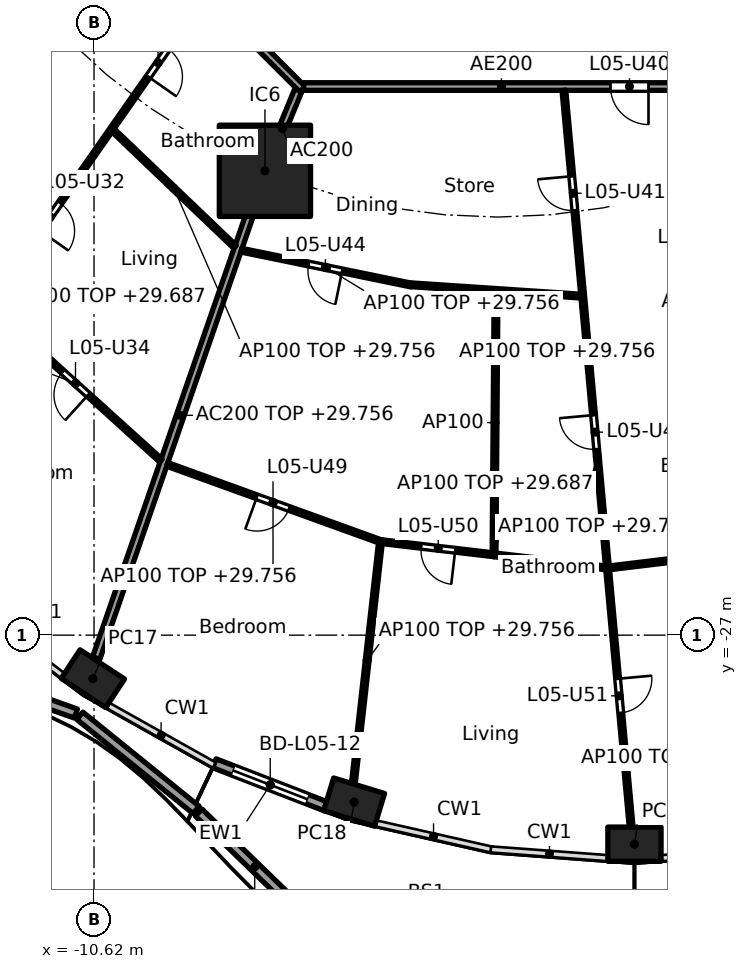
"""IFC4 building model, lengths in metres.
Left out: names, types, materials, properties, quantities, classifications, styles, units other than length and angle.
Written with IfcOpenShell. Run it as: python <this file> out.ifc"""

import sys

from ifc_helpers import new_model, si_unit, direction, frame, frame_2d, origin, origin_2d, place, context, subcontext, project, spatial, rectangle, hollow_rectangle, extrude, element, fill, save


model = new_model("IFC4")
c1 = context("Model", 3, precision=1e-05, world=origin(), true_north=direction((0.0, 1.0)))
c2 = subcontext(c1, "Body", "Model", "MODEL_VIEW")
j1 = project(units=[si_unit("LENGTHUNIT", "METRE"), si_unit("PLANEANGLEUNIT", "RADIAN")], contexts=[c1])
p1 = place(None, origin())
s1 = spatial("IfcSite", under=j1, at=p1, CompositionType="ELEMENT")
p2 = place(p1, origin())
s2 = spatial("IfcBuilding", under=s1, at=p2, CompositionType="ELEMENT")
p3 = place(p2, frame((0.0, 0.0, 27.0)))
s3 = spatial("IfcBuildingStorey", under=s2, at=p3, CompositionType="ELEMENT", Elevation=27.0)
for number, where, z_axis, x_axis in (
    (1, (-10.65, -28.146, 0.0), (0.0, 0.0, 1.0), (0.836, -0.549, 0.0)),
    (2, (-3.776, -31.393, 0.0), (0.0, 0.0, 1.0), (0.957, -0.292, 0.0)),
    (3, (3.6, -32.5, 0.0), (0.0, 0.0, 1.0), (1.0, 0.0, 0.0)),
):
    element("IfcColumn", number, at=place(p3, frame(where, z_axis=z_axis, x_axis=x_axis)), inside=s3, PredefinedType="COLUMN", context=c2, shape_type="SweptSolid", body=[
        extrude(hollow_rectangle(XDim=1.4, YDim=0.9, WallThickness=0.05, at=origin_2d()), origin(), (0.0, 0.0, 1.0), 3.7),
    ])
p4 = place(p3, frame((-6.123, -14.782, 0.0), z_axis=(0.0, 0.0, 1.0), x_axis=(1.0, 0.0, 0.0)))
e4 = element("IfcColumn", 4, at=p4, inside=s3, PredefinedType="COLUMN", context=c2, shape_type="SweptSolid", body=[
    extrude(rectangle(XDim=2.4, YDim=2.4, at=origin_2d()), origin(), (0.0, 0.0, 1.0), 3.7),
])
p5 = place(p3, frame((-4.514, -31.507, 0.0), z_axis=(0.0, 0.0, 1.0), x_axis=(-0.932809381943, 0.360370166577, 0.0)))
e5 = element("IfcWall", 5, at=p5, inside=s3, PredefinedType="SOLIDWALL", context=c2, shape_type="SweptSolid", body=[
    extrude(rectangle(XDim=3.151, YDim=0.25, at=frame_2d((1.575, 0.0))), origin(), (0.0, 0.0, 1.0), 3.44),
])
p6 = place(p5, frame((0.525, 0.0, 0.0)))
e6 = element("IfcOpeningElement", 6, at=p6, cuts=e5, PredefinedType="OPENING", context=c2, shape_type="SweptSolid", body=[
    extrude(rectangle(XDim=2.1, YDim=2.4, at=frame_2d((1.05, 1.2))), frame((0.0, 0.135, 0.0), z_axis=(0.0, -1.0, 0.0), x_axis=(1.0, 0.0, 0.0)), (0.0, 0.0, 1.0), 0.27),
])
p7 = place(p3, frame((-17.373, -26.838, 0.0), z_axis=(0.0, 0.0, 1.0), x_axis=(0.94252427227, -0.334137690453, 0.0)))
e7 = element("IfcWall", 7, at=p7, inside=s3, PredefinedType="PARAPET", context=c2, shape_type="SweptSolid", body=[
    extrude(rectangle(XDim=6.657, YDim=0.25, at=frame_2d((3.329, 0.0))), origin(), (0.0, 0.0, 1.0), 1.1),
])
p8 = place(p3, frame((-10.993, -29.122, 0.0), z_axis=(0.0, 0.0, 1.0), x_axis=(0.777298307168, -0.62913221319, 0.0)))
e8 = element("IfcWall", 8, at=p8, inside=s3, PredefinedType="PARAPET", context=c2, shape_type="SweptSolid", body=[
    extrude(rectangle(XDim=3.937, YDim=0.25, at=frame_2d((1.968, 0.0))), origin(), (0.0, 0.0, 1.0), 1.1),
])
p9 = place(p3, frame((-7.866, -31.667, 0.0), z_axis=(0.0, 0.0, 1.0), x_axis=(0.717813068458, -0.696235878672, 0.0)))
e9 = element("IfcWall", 9, at=p9, inside=s3, PredefinedType="PARAPET", context=c2, shape_type="SweptSolid", body=[
    extrude(rectangle(XDim=4.107, YDim=0.25, at=frame_2d((2.054, 0.0))), origin(), (0.0, 0.0, 1.0), 1.1),
])
p10 = place(p3, frame((3.487, -34.99, 0.0), z_axis=(0.0, 0.0, 1.0), x_axis=(0.932281162563, 0.361734479874, 0.0)))
e10 = element("IfcWall", 10, at=p10, inside=s3, PredefinedType="PARAPET", context=c2, shape_type="SweptSolid", body=[
    extrude(rectangle(XDim=5.513, YDim=0.25, at=frame_2d((2.756, 0.0))), origin(), (0.0, 0.0, 1.0), 1.1),
])
p11 = place(p3, frame((-5.243, -12.657, 0.0), z_axis=(0.0, 0.0, 1.0), x_axis=(-0.382668627144, -0.923885664896, 0.0)))
e11 = element("IfcWall", 11, at=p11, inside=s3, PredefinedType="PARTITIONING", context=c2, shape_type="SweptSolid", body=[
    extrude(rectangle(XDim=2.2, YDim=0.2, at=frame_2d((1.1, 0.0))), origin(), (0.0, 0.0, 1.0), 3.44),
])
p12 = place(p3, frame((-6.139, -14.829, 0.0), z_axis=(0.0, 0.0, 1.0), x_axis=(-0.327178799566, -0.944962450637, 0.0)))
e12 = element("IfcWall", 12, at=p12, inside=s3, PredefinedType="PARTITIONING", context=c2, shape_type="SweptSolid", body=[
    extrude(rectangle(XDim=13.517, YDim=0.2, at=frame_2d((6.759, 0.0))), origin(), (0.0, 0.0, 1.0), 2.756),
])
p13 = place(p3, frame((-12.635, -5.134, 0.0), z_axis=(0.0, 0.0, 1.0), x_axis=(0.707106781187, -0.707106781187, 0.0)))
e13 = element("IfcWall", 13, at=p13, inside=s3, PredefinedType="PARTITIONING", context=c2, shape_type="SweptSolid", body=[
    extrude(rectangle(XDim=10.609, YDim=0.2, at=frame_2d((5.305, 0.0))), origin(), (0.0, 0.0, 1.0), 3.44),
])
p14 = place(p13, frame((4.804, 0.0, 0.0)))
e14 = element("IfcOpeningElement", 14, at=p14, cuts=e13, PredefinedType="OPENING", context=c2, shape_type="SweptSolid", body=[
    extrude(rectangle(XDim=1.0, YDim=2.1, at=frame_2d((0.5, 1.05))), frame((0.0, 0.11, 0.0), z_axis=(0.0, -1.0, 0.0), x_axis=(1.0, 0.0, 0.0)), (0.0, 0.0, 1.0), 0.22),
])
p15 = place(p3, frame((-5.104, -12.565, 0.0), z_axis=(0.0, 0.0, 1.0), x_axis=(1.0, 0.0, 0.0)))
e15 = element("IfcWall", 15, at=p15, inside=s3, PredefinedType="PARTITIONING", context=c2, shape_type="SweptSolid", body=[
    extrude(rectangle(XDim=10.409, YDim=0.2, at=frame_2d((5.205, 0.0))), origin(), (0.0, 0.0, 1.0), 3.44),
])
p16 = place(p15, frame((8.074, 0.0, 0.0)))
e16 = element("IfcOpeningElement", 16, at=p16, cuts=e15, PredefinedType="OPENING", context=c2, shape_type="SweptSolid", body=[
    extrude(rectangle(XDim=1.0, YDim=2.1, at=frame_2d((0.5, 1.05))), frame((0.0, 0.11, 0.0), z_axis=(0.0, -1.0, 0.0), x_axis=(1.0, 0.0, 0.0)), (0.0, 0.0, 1.0), 0.22),
])
p17 = place(p3, frame((-10.19, -7.719, 0.0), z_axis=(0.0, 0.0, 1.0), x_axis=(-0.790264549439, -0.612765813259, 0.0)))
e17 = element("IfcWall", 17, at=p17, inside=s3, PredefinedType="PARTITIONING", context=c2, shape_type="SweptSolid", body=[
    extrude(rectangle(XDim=8.896, YDim=0.1, at=frame_2d((4.448, 0.0))), origin(), (0.0, 0.0, 1.0), 2.687),
])
p18 = place(p17, frame((1.448, 0.0, 0.0)))
e18 = element("IfcOpeningElement", 18, at=p18, cuts=e17, PredefinedType="OPENING", context=c2, shape_type="SweptSolid", body=[
    extrude(rectangle(XDim=0.9, YDim=2.1, at=frame_2d((0.45, 1.05))), frame((0.0, 0.06, 0.0), z_axis=(0.0, -1.0, 0.0), x_axis=(1.0, 0.0, 0.0)), (0.0, 0.0, 1.0), 0.12),
])
p19 = place(p17, frame((5.871, 0.0, 0.0)))
e19 = element("IfcOpeningElement", 19, at=p19, cuts=e17, PredefinedType="OPENING", context=c2, shape_type="SweptSolid", body=[
    extrude(rectangle(XDim=0.9, YDim=2.1, at=frame_2d((0.45, 1.05))), frame((0.0, 0.06, 0.0), z_axis=(0.0, -1.0, 0.0), x_axis=(1.0, 0.0, 0.0)), (0.0, 0.0, 1.0), 0.12),
])
p20 = place(p3, frame((-7.715, -10.193, 0.0), z_axis=(0.0, 0.0, 1.0), x_axis=(-0.573126964124, -0.819466584428, 0.0)))
e20 = element("IfcWall", 20, at=p20, inside=s3, PredefinedType="PARTITIONING", context=c2, shape_type="SweptSolid", body=[
    extrude(rectangle(XDim=15.001, YDim=0.1, at=frame_2d((7.5, 0.0))), origin(), (0.0, 0.0, 1.0), 2.687),
])
p21 = place(p20, frame((1.678, 0.0, 0.0)))
e21 = element("IfcOpeningElement", 21, at=p21, cuts=e20, PredefinedType="OPENING", context=c2, shape_type="SweptSolid", body=[
    extrude(rectangle(XDim=0.9, YDim=2.1, at=frame_2d((0.45, 1.05))), frame((0.0, 0.06, 0.0), z_axis=(0.0, -1.0, 0.0), x_axis=(1.0, 0.0, 0.0)), (0.0, 0.0, 1.0), 0.12),
])
p22 = place(p20, frame((6.631, 0.0, 0.0)))
e22 = element("IfcOpeningElement", 22, at=p22, cuts=e20, PredefinedType="OPENING", context=c2, shape_type="SweptSolid", body=[
    extrude(rectangle(XDim=0.9, YDim=2.1, at=frame_2d((0.45, 1.05))), frame((0.0, 0.06, 0.0), z_axis=(0.0, -1.0, 0.0), x_axis=(1.0, 0.0, 0.0)), (0.0, 0.0, 1.0), 0.12),
])
p23 = place(p3, frame((-10.119, -13.716, 0.0), z_axis=(0.0, 0.0, 1.0), x_axis=(0.722775679202, -0.691082713975, 0.0)))
e23 = element("IfcWall", 23, at=p23, inside=s3, PredefinedType="PARTITIONING", context=c2, shape_type="SweptSolid", body=[
    extrude(rectangle(XDim=4.437, YDim=0.1, at=frame_2d((2.219, 0.0))), origin(), (0.0, 0.0, 1.0), 2.756),
])
p24 = place(p3, frame((-13.355, -18.343, 0.0), z_axis=(0.0, 0.0, 1.0), x_axis=(0.741713303551, -0.670717060567, 0.0)))
e24 = element("IfcWall", 24, at=p24, inside=s3, PredefinedType="PARTITIONING", context=c2, shape_type="SweptSolid", body=[
    extrude(rectangle(XDim=6.059, YDim=0.1, at=frame_2d((3.03, 0.0))), origin(), (0.0, 0.0, 1.0), 2.756),
])
p25 = place(p24, frame((2.58, 0.0, 0.0)))
e25 = element("IfcOpeningElement", 25, at=p25, cuts=e24, PredefinedType="OPENING", context=c2, shape_type="SweptSolid", body=[
    extrude(rectangle(XDim=0.9, YDim=2.1, at=frame_2d((0.45, 1.05))), frame((0.0, 0.06, 0.0), z_axis=(0.0, -1.0, 0.0), x_axis=(1.0, 0.0, 0.0)), (0.0, 0.0, 1.0), 0.12),
])
p26 = place(p3, frame((-6.741, -16.872, 0.0), z_axis=(0.0, 0.0, 1.0), x_axis=(0.979595137747, -0.200981009307, 0.0)))
e26 = element("IfcWall", 26, at=p26, inside=s3, PredefinedType="PARTITIONING", context=c2, shape_type="SweptSolid", body=[
    extrude(rectangle(XDim=4.562, YDim=0.1, at=frame_2d((2.281, 0.0))), origin(), (0.0, 0.0, 1.0), 2.756),
])
p27 = place(p26, frame((1.806, 0.0, 0.0)))
e27 = element("IfcOpeningElement", 27, at=p27, cuts=e26, PredefinedType="OPENING", context=c2, shape_type="SweptSolid", body=[
    extrude(rectangle(XDim=0.9, YDim=2.1, at=frame_2d((0.45, 1.05))), frame((0.0, 0.06, 0.0), z_axis=(0.0, -1.0, 0.0), x_axis=(1.0, 0.0, 0.0)), (0.0, 0.0, 1.0), 0.12),
])
p28 = place(p3, frame((-8.692, -22.508, 0.0), z_axis=(0.0, 0.0, 1.0), x_axis=(0.940401494588, -0.340066212636, 0.0)))
e28 = element("IfcWall", 28, at=p28, inside=s3, PredefinedType="PARTITIONING", context=c2, shape_type="SweptSolid", body=[
    extrude(rectangle(XDim=5.917, YDim=0.1, at=frame_2d((2.958, 0.0))), origin(), (0.0, 0.0, 1.0), 2.756),
])
p29 = place(p28, frame((2.509, 0.0, 0.0)))
e29 = element("IfcOpeningElement", 29, at=p29, cuts=e28, PredefinedType="OPENING", context=c2, shape_type="SweptSolid", body=[
    extrude(rectangle(XDim=0.9, YDim=2.1, at=frame_2d((0.45, 1.05))), frame((0.0, 0.06, 0.0), z_axis=(0.0, -1.0, 0.0), x_axis=(1.0, 0.0, 0.0)), (0.0, 0.0, 1.0), 0.12),
])
p30 = place(p3, frame((-2.271, -17.782, 0.0), z_axis=(0.0, 0.0, 1.0), x_axis=(0.997791437766, -0.066424744789, 0.0)))
e30 = element("IfcWall", 30, at=p30, inside=s3, PredefinedType="PARTITIONING", context=c2, shape_type="SweptSolid", body=[
    extrude(rectangle(XDim=4.469, YDim=0.1, at=frame_2d((2.235, 0.0))), origin(), (0.0, 0.0, 1.0), 2.756),
])
p31 = place(p3, frame((-3.075, -24.488, 0.0), z_axis=(0.0, 0.0, 1.0), x_axis=(-0.111705235978, -0.993741384997, 0.0)))
e31 = element("IfcWall", 31, at=p31, inside=s3, PredefinedType="PARTITIONING", context=c2, shape_type="SweptSolid", body=[
    extrude(rectangle(XDim=6.395, YDim=0.1, at=frame_2d((3.198, 0.0))), origin(), (0.0, 0.0, 1.0), 2.756),
])
p32 = place(p3, frame((-3.031, -24.543, 0.0), z_axis=(0.0, 0.0, 1.0), x_axis=(0.993255612046, -0.115945198862, 0.0)))
e32 = element("IfcWall", 32, at=p32, inside=s3, PredefinedType="PARTITIONING", context=c2, shape_type="SweptSolid", body=[
    extrude(rectangle(XDim=5.913, YDim=0.1, at=frame_2d((2.956, 0.0))), origin(), (0.0, 0.0, 1.0), 2.756),
])
p33 = place(p32, frame((1.028, 0.0, 0.0)))
e33 = element("IfcOpeningElement", 33, at=p33, cuts=e32, PredefinedType="OPENING", context=c2, shape_type="SweptSolid", body=[
    extrude(rectangle(XDim=0.9, YDim=2.1, at=frame_2d((0.45, 1.05))), frame((0.0, 0.06, 0.0), z_axis=(0.0, -1.0, 0.0), x_axis=(1.0, 0.0, 0.0)), (0.0, 0.0, 1.0), 0.12),
])
p34 = place(p3, frame((-0.042, -17.98, 0.0), z_axis=(0.0, 0.0, 1.0), x_axis=(-0.007692080119, -0.999970415514, 0.0)))
e34 = element("IfcWall", 34, at=p34, inside=s3, PredefinedType="PARTITIONING", context=c2, shape_type="SweptSolid", body=[
    extrude(rectangle(XDim=6.856, YDim=0.1, at=frame_2d((3.428, 0.0))), origin(), (0.0, 0.0, 1.0), 3.44),
])
p35 = place(p3, frame((1.744, -12.664, 0.0), z_axis=(0.0, 0.0, 1.0), x_axis=(0.090893639596, -0.995860605849, 0.0)))
e35 = element("IfcWall", 35, at=p35, inside=s3, PredefinedType="PARTITIONING", context=c2, shape_type="SweptSolid", body=[
    extrude(rectangle(XDim=19.374, YDim=0.1, at=frame_2d((9.687, 0.0))), origin(), (0.0, 0.0, 1.0), 2.687),
])
p36 = place(p35, frame((2.27, 0.0, 0.0)))
e36 = element("IfcOpeningElement", 36, at=p36, cuts=e35, PredefinedType="OPENING", context=c2, shape_type="SweptSolid", body=[
    extrude(rectangle(XDim=0.9, YDim=2.1, at=frame_2d((0.45, 1.05))), frame((0.0, 0.06, 0.0), z_axis=(0.0, -1.0, 0.0), x_axis=(1.0, 0.0, 0.0)), (0.0, 0.0, 1.0), 0.12),
])
p37 = place(p35, frame((8.582, 0.0, 0.0)))
e37 = element("IfcOpeningElement", 37, at=p37, cuts=e35, PredefinedType="OPENING", context=c2, shape_type="SweptSolid", body=[
    extrude(rectangle(XDim=0.9, YDim=2.1, at=frame_2d((0.45, 1.05))), frame((0.0, 0.06, 0.0), z_axis=(0.0, -1.0, 0.0), x_axis=(1.0, 0.0, 0.0)), (0.0, 0.0, 1.0), 0.12),
])
p38 = place(p35, frame((15.548, 0.0, 0.0)))
e38 = element("IfcOpeningElement", 38, at=p38, cuts=e35, PredefinedType="OPENING", context=c2, shape_type="SweptSolid", body=[
    extrude(rectangle(XDim=0.9, YDim=2.1, at=frame_2d((0.45, 1.05))), frame((0.0, 0.06, 0.0), z_axis=(0.0, -1.0, 0.0), x_axis=(1.0, 0.0, 0.0)), (0.0, 0.0, 1.0), 0.12),
])
p39 = place(p3, frame((2.941, -25.229, 0.0), z_axis=(0.0, 0.0, 1.0), x_axis=(0.992836798252, 0.119478416615, 0.0)))
e39 = element("IfcWall", 39, at=p39, inside=s3, PredefinedType="PARTITIONING", context=c2, shape_type="SweptSolid", body=[
    extrude(rectangle(XDim=6.01, YDim=0.1, at=frame_2d((3.005, 0.0))), origin(), (0.0, 0.0, 1.0), 2.756),
])
p40 = place(p6, origin())
e40 = element("IfcDoor", 40, at=p40, inside=s3, OperationType="SLIDING_TO_LEFT", PredefinedType="DOOR", context=c2, shape_type="SweptSolid", body=[
    extrude(rectangle(XDim=2.1, YDim=2.4, at=frame_2d((1.05, 1.2))), frame((0.0, 0.025, 0.0), z_axis=(0.0, -1.0, 0.0), x_axis=(1.0, 0.0, 0.0)), (0.0, 0.0, 1.0), 0.05),
])
fill(e6, e40)
p41 = place(p21, origin())
e41 = element("IfcDoor", 41, at=p41, inside=s3, OperationType="SINGLE_SWING_RIGHT", PredefinedType="DOOR", context=c2, shape_type="SweptSolid", body=[
    extrude(rectangle(XDim=0.9, YDim=2.1, at=frame_2d((0.45, 1.05))), frame((0.0, 0.025, 0.0), z_axis=(0.0, -1.0, 0.0), x_axis=(1.0, 0.0, 0.0)), (0.0, 0.0, 1.0), 0.05),
])
fill(e21, e41)
p42 = place(p22, origin())
e42 = element("IfcDoor", 42, at=p42, inside=s3, OperationType="SINGLE_SWING_RIGHT", PredefinedType="DOOR", context=c2, shape_type="SweptSolid", body=[
    extrude(rectangle(XDim=0.9, YDim=2.1, at=frame_2d((0.45, 1.05))), frame((0.0, 0.025, 0.0), z_axis=(0.0, -1.0, 0.0), x_axis=(1.0, 0.0, 0.0)), (0.0, 0.0, 1.0), 0.05),
])
fill(e22, e42)
p43 = place(p25, frame((0.9, 0.0, 0.0), x_axis=(-1.0, 0.0, 0.0)))
e43 = element("IfcDoor", 43, at=p43, inside=s3, OperationType="SINGLE_SWING_LEFT", PredefinedType="DOOR", context=c2, shape_type="SweptSolid", body=[
    extrude(rectangle(XDim=0.9, YDim=2.1, at=frame_2d((0.45, 1.05))), frame((0.0, 0.025, 0.0), z_axis=(0.0, -1.0, 0.0), x_axis=(1.0, 0.0, 0.0)), (0.0, 0.0, 1.0), 0.05),
])
fill(e25, e43)
p44 = place(p16, frame((1.0, 0.0, 0.0), x_axis=(-1.0, 0.0, 0.0)))
e44 = element("IfcDoor", 44, at=p44, inside=s3, OperationType="SINGLE_SWING_LEFT", PredefinedType="DOOR", context=c2, shape_type="SweptSolid", body=[
    extrude(rectangle(XDim=1.0, YDim=2.1, at=frame_2d((0.5, 1.05))), frame((0.0, 0.025, 0.0), z_axis=(0.0, -1.0, 0.0), x_axis=(1.0, 0.0, 0.0)), (0.0, 0.0, 1.0), 0.05),
])
fill(e16, e44)
p45 = place(p36, frame((0.9, 0.0, 0.0), x_axis=(-1.0, 0.0, 0.0)))
e45 = element("IfcDoor", 45, at=p45, inside=s3, OperationType="SINGLE_SWING_RIGHT", PredefinedType="DOOR", context=c2, shape_type="SweptSolid", body=[
    extrude(rectangle(XDim=0.9, YDim=2.1, at=frame_2d((0.45, 1.05))), frame((0.0, 0.025, 0.0), z_axis=(0.0, -1.0, 0.0), x_axis=(1.0, 0.0, 0.0)), (0.0, 0.0, 1.0), 0.05),
])
fill(e36, e45)
p46 = place(p27, frame((0.9, 0.0, 0.0), x_axis=(-1.0, 0.0, 0.0)))
e46 = element("IfcDoor", 46, at=p46, inside=s3, OperationType="SINGLE_SWING_LEFT", PredefinedType="DOOR", context=c2, shape_type="SweptSolid", body=[
    extrude(rectangle(XDim=0.9, YDim=2.1, at=frame_2d((0.45, 1.05))), frame((0.0, 0.025, 0.0), z_axis=(0.0, -1.0, 0.0), x_axis=(1.0, 0.0, 0.0)), (0.0, 0.0, 1.0), 0.05),
])
fill(e27, e46)
p47 = place(p37, frame((0.9, 0.0, 0.0), x_axis=(-1.0, 0.0, 0.0)))
e47 = element("IfcDoor", 47, at=p47, inside=s3, OperationType="SINGLE_SWING_RIGHT", PredefinedType="DOOR", context=c2, shape_type="SweptSolid", body=[
    extrude(rectangle(XDim=0.9, YDim=2.1, at=frame_2d((0.45, 1.05))), frame((0.0, 0.025, 0.0), z_axis=(0.0, -1.0, 0.0), x_axis=(1.0, 0.0, 0.0)), (0.0, 0.0, 1.0), 0.05),
])
fill(e37, e47)
p48 = place(p29, frame((0.9, 0.0, 0.0), x_axis=(-1.0, 0.0, 0.0)))
e48 = element("IfcDoor", 48, at=p48, inside=s3, OperationType="SINGLE_SWING_RIGHT", PredefinedType="DOOR", context=c2, shape_type="SweptSolid", body=[
    extrude(rectangle(XDim=0.9, YDim=2.1, at=frame_2d((0.45, 1.05))), frame((0.0, 0.025, 0.0), z_axis=(0.0, -1.0, 0.0), x_axis=(1.0, 0.0, 0.0)), (0.0, 0.0, 1.0), 0.05),
])
fill(e29, e48)
p49 = place(p33, frame((0.9, 0.0, 0.0), x_axis=(-1.0, 0.0, 0.0)))
e49 = element("IfcDoor", 49, at=p49, inside=s3, OperationType="SINGLE_SWING_LEFT", PredefinedType="DOOR", context=c2, shape_type="SweptSolid", body=[
    extrude(rectangle(XDim=0.9, YDim=2.1, at=frame_2d((0.45, 1.05))), frame((0.0, 0.025, 0.0), z_axis=(0.0, -1.0, 0.0), x_axis=(1.0, 0.0, 0.0)), (0.0, 0.0, 1.0), 0.05),
])
fill(e33, e49)
p50 = place(p38, origin())
e50 = element("IfcDoor", 50, at=p50, inside=s3, OperationType="SINGLE_SWING_LEFT", PredefinedType="DOOR", context=c2, shape_type="SweptSolid", body=[
    extrude(rectangle(XDim=0.9, YDim=2.1, at=frame_2d((0.45, 1.05))), frame((0.0, 0.025, 0.0), z_axis=(0.0, -1.0, 0.0), x_axis=(1.0, 0.0, 0.0)), (0.0, 0.0, 1.0), 0.05),
])
fill(e38, e50)
save(model, sys.argv[1])
